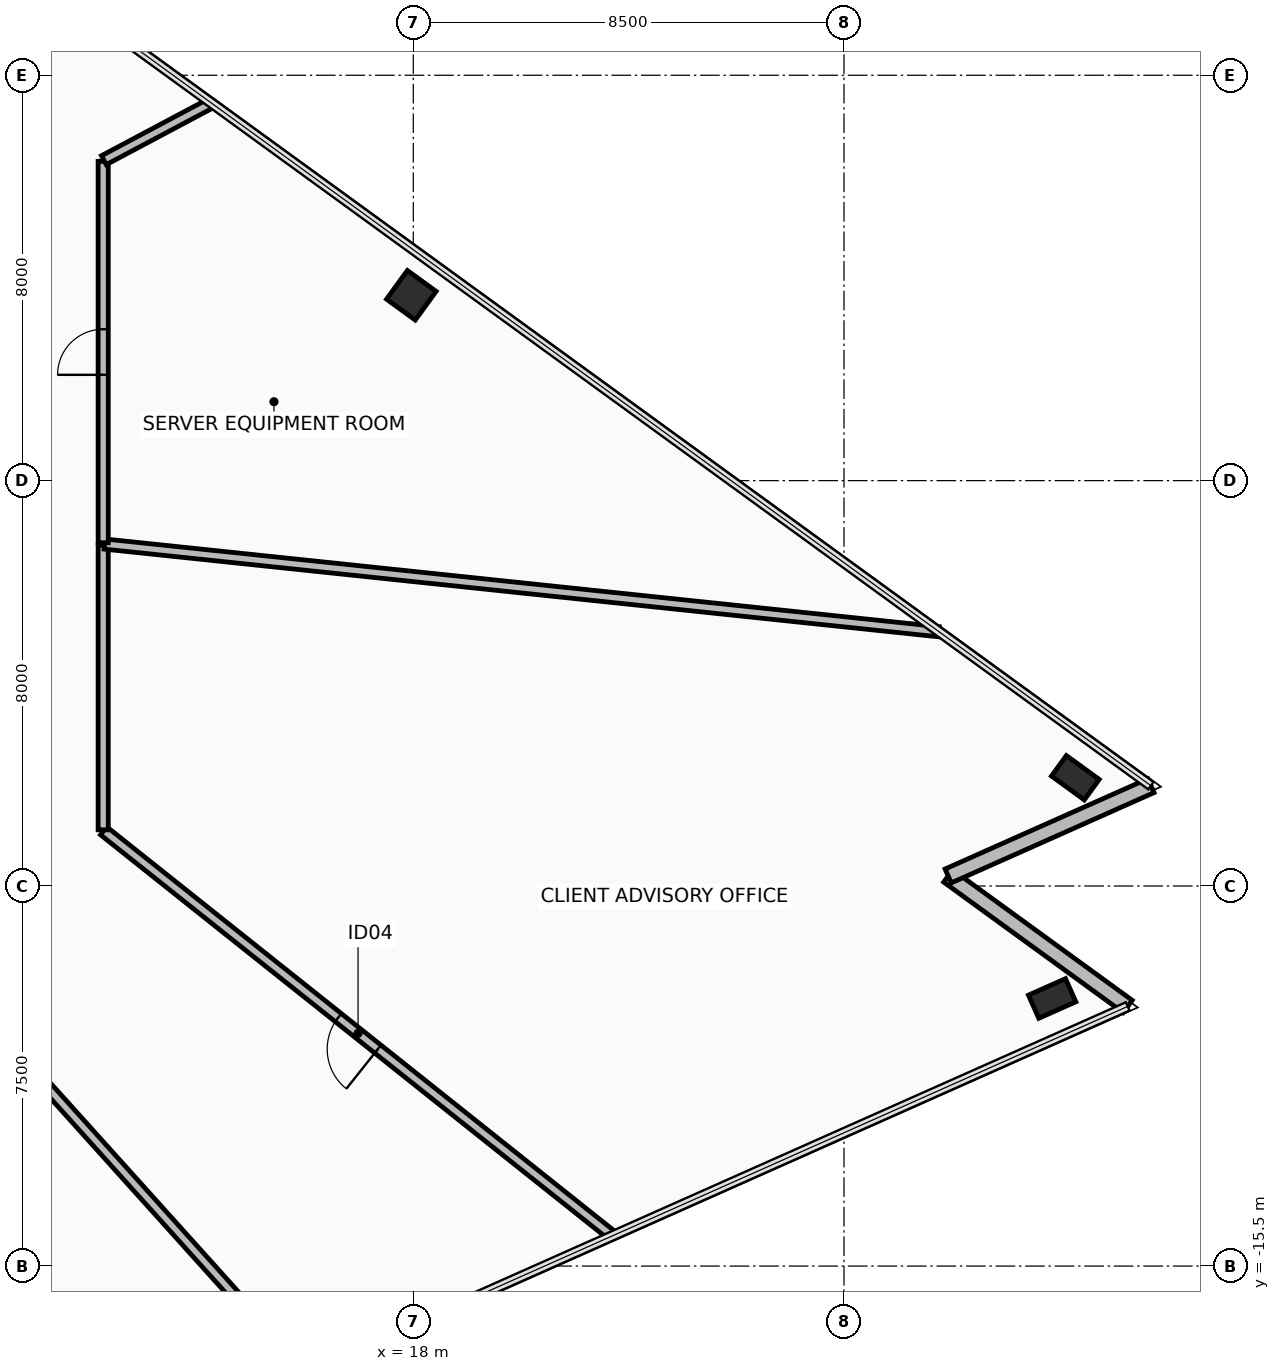
"""IFC4 building model, lengths in metres.
Left out: names, types, materials, properties, quantities, classifications, styles, units other than length and angle.
Written with IfcOpenShell. Run it as: python <this file> out.ifc"""

import sys

from ifc_helpers import new_model, si_unit, direction, frame, frame_2d, origin, origin_2d, place, context, subcontext, project, spatial, rectangle, hollow_rectangle, extrude, element, fill, save


model = new_model("IFC4")
c1 = context("Model", 3, precision=1e-05, world=origin(), true_north=direction((0.0, 1.0)))
c2 = subcontext(c1, "Body", "Model", "MODEL_VIEW")
j1 = project(units=[si_unit("LENGTHUNIT", "METRE"), si_unit("PLANEANGLEUNIT", "RADIAN")], contexts=[c1])
p1 = place(None, origin())
s1 = spatial("IfcSite", under=j1, at=p1, CompositionType="ELEMENT")
p2 = place(p1, origin())
s2 = spatial("IfcBuilding", under=s1, at=p2, CompositionType="ELEMENT")
p3 = place(p2, frame((0.0, 0.0, 116.05)))
s3 = spatial("IfcBuildingStorey", under=s2, at=p3, CompositionType="ELEMENT", Elevation=116.05)
for number, where, z_axis, x_axis in (
    (1, (30.608, -10.219, 0.0), (0.0, 0.0, 1.0), (0.914, 0.407, 0.0)),
    (2, (31.066, -5.863, 0.0), (0.0, 0.0, 1.0), (-0.809, 0.588, 0.0)),
):
    element("IfcColumn", number, at=place(p3, frame(where, z_axis=z_axis, x_axis=x_axis)), inside=s3, PredefinedType="COLUMN", context=c2, shape_type="SweptSolid", body=[
        extrude(hollow_rectangle(XDim=0.5, YDim=0.8, WallThickness=0.04, at=origin_2d()), origin(), (0.0, 0.0, 1.0), 3.6),
    ])
p4 = place(p3, frame((17.961, 3.658, 0.0), z_axis=(0.0, 0.0, 1.0), x_axis=(-0.809016994375, 0.587785252292, 0.0)))
e3 = element("IfcColumn", 3, at=p4, inside=s3, PredefinedType="COLUMN", context=c2, shape_type="SweptSolid", body=[
    extrude(hollow_rectangle(XDim=0.7, YDim=0.7, WallThickness=0.04, at=origin_2d()), origin(), (0.0, 0.0, 1.0), 3.6),
])
for number, where, z_axis, x_axis in (
    (4, (32.1, -10.376, 0.0), (0.0, 0.0, 1.0), (-0.809, 0.588, 0.0)),
    (5, (28.556, -7.802, 0.0), (0.0, 0.0, 1.0), (0.914, 0.407, 0.0)),
):
    element("IfcWall", number, at=place(p3, frame(where, z_axis=z_axis, x_axis=x_axis)), inside=s3, PredefinedType="STANDARD", context=c2, shape_type="SweptSolid", body=[
        extrude(rectangle(XDim=4.38, YDim=0.3, at=frame_2d((2.19, 0.0))), origin(), (0.0, 0.0, 1.0), 2.705),
    ])
p5 = place(p3, frame((9.534, -10.588, 0.0), z_axis=(0.0, 0.0, 1.0), x_axis=(0.669143190424, -0.743133494541, 0.0)))
e6 = element("IfcWall", 6, at=p5, inside=s3, PredefinedType="PARTITIONING", context=c2, shape_type="SweptSolid", body=[
    extrude(rectangle(XDim=9.447, YDim=0.2, at=frame_2d((4.723, 0.0))), origin(), (0.0, 0.0, 1.0), 2.705),
])
p6 = place(p3, frame((21.93, -14.904, 0.0), z_axis=(0.0, 0.0, 1.0), x_axis=(-0.782382790893, 0.622797855258, 0.0)))
e7 = element("IfcWall", 7, at=p6, inside=s3, PredefinedType="PARTITIONING", context=c2, shape_type="SweptSolid", body=[
    extrude(rectangle(XDim=12.834, YDim=0.2, at=frame_2d((6.417, 0.0))), origin(), (0.0, 0.0, 1.0), 2.705),
])
p7 = place(p6, frame((5.917, 0.0, 0.0)))
e8 = element("IfcOpeningElement", 8, at=p7, cuts=e7, PredefinedType="OPENING", context=c2, shape_type="SweptSolid", body=[
    extrude(rectangle(XDim=1.0, YDim=2.15, at=frame_2d((0.5, 1.075))), frame((0.0, 0.11, 0.0), z_axis=(0.0, -1.0, 0.0), x_axis=(1.0, 0.0, 0.0)), (0.0, 0.0, 1.0), 0.22),
])
p8 = place(p3, frame((11.88, -6.891, 0.0), z_axis=(0.0, 0.0, 1.0), x_axis=(0.0, 1.0, 0.0)))
e9 = element("IfcWall", 9, at=p8, inside=s3, PredefinedType="PARTITIONING", context=c2, shape_type="SweptSolid", body=[
    extrude(rectangle(XDim=5.615, YDim=0.2, at=frame_2d((2.808, 0.0))), origin(), (0.0, 0.0, 1.0), 3.41),
])
p9 = place(p3, frame((11.908, -1.251, 0.0), z_axis=(0.0, 0.0, 1.0), x_axis=(0.994520958229, -0.104537379166, 0.0)))
e10 = element("IfcWall", 10, at=p9, inside=s3, PredefinedType="PARTITIONING", context=c2, shape_type="SweptSolid", body=[
    extrude(rectangle(XDim=16.553, YDim=0.2, at=frame_2d((8.277, 0.0))), origin(), (0.0, 0.0, 1.0), 2.705),
])
p10 = place(p3, frame((11.88, -1.226, 0.0), z_axis=(0.0, 0.0, 1.0), x_axis=(0.0, 1.0, 0.0)))
e11 = element("IfcWall", 11, at=p10, inside=s3, PredefinedType="PARTITIONING", context=c2, shape_type="SweptSolid", body=[
    extrude(rectangle(XDim=7.528, YDim=0.2, at=frame_2d((3.764, 0.0))), origin(), (0.0, 0.0, 1.0), 2.855),
])
p11 = place(p10, frame((3.314, 0.0, 0.0)))
e12 = element("IfcOpeningElement", 12, at=p11, cuts=e11, PredefinedType="OPENING", context=c2, shape_type="SweptSolid", body=[
    extrude(rectangle(XDim=0.9, YDim=2.1, at=frame_2d((0.45, 1.05))), frame((0.0, 0.11, 0.0), z_axis=(0.0, -1.0, 0.0), x_axis=(1.0, 0.0, 0.0)), (0.0, 0.0, 1.0), 0.22),
])
p12 = place(p3, frame((11.893, 6.324, 0.0), z_axis=(0.0, 0.0, 1.0), x_axis=(0.882960772141, 0.469446775321, 0.0)))
e13 = element("IfcWall", 13, at=p12, inside=s3, PredefinedType="PARTITIONING", context=c2, shape_type="SweptSolid", body=[
    extrude(rectangle(XDim=2.388, YDim=0.2, at=frame_2d((1.194, 0.0))), origin(), (0.0, 0.0, 1.0), 2.705),
])
p13 = place(p7, origin())
e14 = element("IfcDoor", 14, at=p13, inside=s3, OperationType="SINGLE_SWING_RIGHT", PredefinedType="DOOR", context=c2, shape_type="SweptSolid", body=[
    extrude(rectangle(XDim=1.0, YDim=2.15, at=frame_2d((0.5, 1.075))), frame((0.0, 0.025, 0.0), z_axis=(0.0, -1.0, 0.0), x_axis=(1.0, 0.0, 0.0)), (0.0, 0.0, 1.0), 0.05),
])
fill(e8, e14)
p14 = place(p11, origin())
e15 = element("IfcDoor", 15, at=p14, inside=s3, OperationType="SINGLE_SWING_LEFT", PredefinedType="DOOR", context=c2, shape_type="SweptSolid", body=[
    extrude(rectangle(XDim=0.9, YDim=2.1, at=frame_2d((0.45, 1.05))), frame((0.0, 0.025, 0.0), z_axis=(0.0, -1.0, 0.0), x_axis=(1.0, 0.0, 0.0)), (0.0, 0.0, 1.0), 0.05),
])
fill(e12, e15)
save(model, sys.argv[1])
